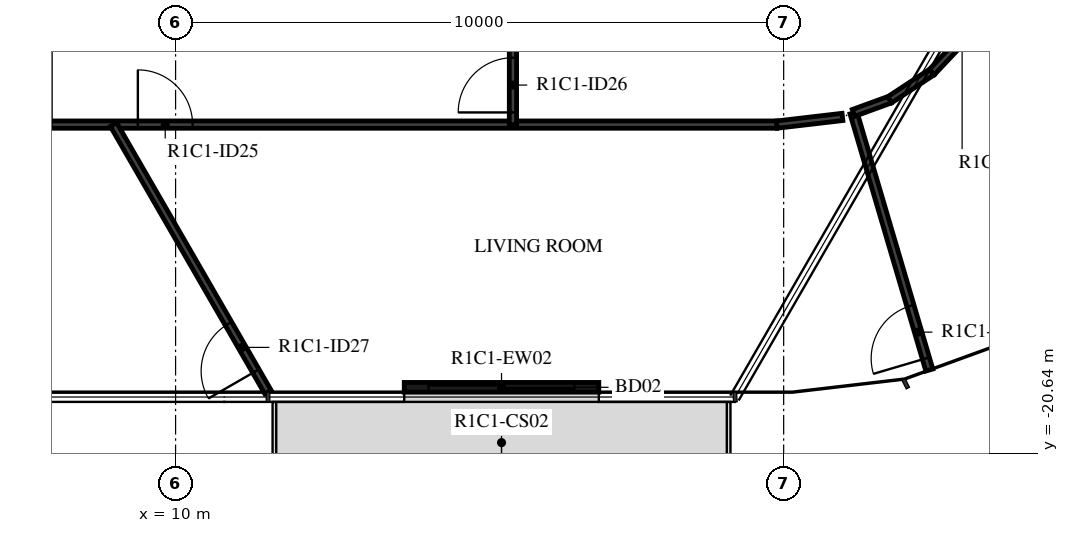
"""IFC4 building model, lengths in metres.
Left out: names, types, materials, properties, quantities, classifications, styles, units other than length and angle.
Written with IfcOpenShell. Run it as: python <this file> out.ifc"""

import sys

from ifc_helpers import new_model, si_unit, direction, frame, frame_2d, origin, place, context, subcontext, project, spatial, rectangle, extrude, element, fill, save


model = new_model("IFC4")
c1 = context("Model", 3, precision=1e-05, world=origin(), true_north=direction((0.0, 1.0)))
c2 = subcontext(c1, "Body", "Model", "MODEL_VIEW")
j1 = project(units=[si_unit("LENGTHUNIT", "METRE"), si_unit("PLANEANGLEUNIT", "RADIAN")], contexts=[c1])
p1 = place(None, origin())
s1 = spatial("IfcSite", under=j1, at=p1, CompositionType="ELEMENT")
p2 = place(p1, origin())
s2 = spatial("IfcBuilding", under=s1, at=p2, CompositionType="ELEMENT")
p3 = place(p2, frame((0.0, 0.0, 62.9)))
s3 = spatial("IfcBuildingStorey", under=s2, at=p3, CompositionType="ELEMENT", Elevation=62.9)
p4 = place(p3, frame((13.76, -19.55, 0.0), z_axis=(0.0, 0.0, 1.0), x_axis=(1.0, 0.0, 0.0)))
e1 = element("IfcWall", 1, at=p4, inside=s3, PredefinedType="STANDARD", context=c2, shape_type="SweptSolid", body=[
    extrude(rectangle(XDim=3.2, YDim=0.16, at=frame_2d((1.6, 0.0))), origin(), (0.0, 0.0, 1.0), 3.12),
])
p5 = place(p4, frame((0.4, 0.0, 0.0)))
e2 = element("IfcOpeningElement", 2, at=p5, cuts=e1, PredefinedType="OPENING", context=c2, shape_type="SweptSolid", body=[
    extrude(rectangle(XDim=2.4, YDim=2.4, at=frame_2d((1.2, 1.2))), frame((0.0, 0.09, 0.0), z_axis=(0.0, -1.0, 0.0), x_axis=(1.0, 0.0, 0.0)), (0.0, 0.0, 1.0), 0.18),
])
p6 = place(p3, frame((27.025, -15.603, 0.0), z_axis=(0.0, 0.0, 1.0), x_axis=(-0.866030653443, 0.499990907215, 0.0)))
e3 = element("IfcWall", 3, at=p6, inside=s3, PredefinedType="STANDARD", context=c2, shape_type="SweptSolid", body=[
    extrude(rectangle(XDim=6.271, YDim=0.2, at=frame_2d((3.136, 0.0))), origin(), (0.0, 0.0, 1.0), 3.12),
])
p7 = place(p3, frame((7.881, -15.23, 0.0), z_axis=(0.0, 0.0, 1.0), x_axis=(1.0, 0.0, 0.0)))
e4 = element("IfcWall", 4, at=p7, inside=s3, PredefinedType="PARTITIONING", context=c2, shape_type="SweptSolid", body=[
    extrude(rectangle(XDim=12.006, YDim=0.12, at=frame_2d((6.003, 0.0))), origin(), (0.0, 0.0, 1.0), 3.12),
])
p8 = place(p7, frame((1.499, 0.0, 0.0)))
e5 = element("IfcOpeningElement", 5, at=p8, cuts=e4, PredefinedType="OPENING", context=c2, shape_type="SweptSolid", body=[
    extrude(rectangle(XDim=0.9, YDim=2.1, at=frame_2d((0.45, 1.05))), frame((0.0, 0.07, 0.0), z_axis=(0.0, -1.0, 0.0), x_axis=(1.0, 0.0, 0.0)), (0.0, 0.0, 1.0), 0.14),
])
p9 = place(p3, frame((15.548, -15.23, 0.0), z_axis=(0.0, 0.0, 1.0), x_axis=(0.0, 1.0, 0.0)))
e6 = element("IfcWall", 6, at=p9, inside=s3, PredefinedType="PARTITIONING", context=c2, shape_type="SweptSolid", body=[
    extrude(rectangle(XDim=6.253, YDim=0.12, at=frame_2d((3.127, 0.0))), origin(), (0.0, 0.0, 1.0), 3.12),
])
p10 = place(p9, frame((0.2, 0.0, 0.0)))
e7 = element("IfcOpeningElement", 7, at=p10, cuts=e6, PredefinedType="OPENING", context=c2, shape_type="SweptSolid", body=[
    extrude(rectangle(XDim=0.9, YDim=2.1, at=frame_2d((0.45, 1.05))), frame((0.0, 0.07, 0.0), z_axis=(0.0, -1.0, 0.0), x_axis=(1.0, 0.0, 0.0)), (0.0, 0.0, 1.0), 0.14),
])
p11 = place(p3, frame((11.52, -19.63, 0.0), z_axis=(0.0, 0.0, 1.0), x_axis=(-0.499999763888, 0.866025540104, 0.0)))
e8 = element("IfcWall", 8, at=p11, inside=s3, PredefinedType="PARTITIONING", context=c2, shape_type="SweptSolid", body=[
    extrude(rectangle(XDim=5.081, YDim=0.12, at=frame_2d((2.54, 0.0))), origin(), (0.0, 0.0, 1.0), 3.12),
])
p12 = place(p11, frame((0.4, 0.0, 0.0)))
e9 = element("IfcOpeningElement", 9, at=p12, cuts=e8, PredefinedType="OPENING", context=c2, shape_type="SweptSolid", body=[
    extrude(rectangle(XDim=0.9, YDim=2.1, at=frame_2d((0.45, 1.05))), frame((0.0, 0.07, 0.0), z_axis=(0.0, -1.0, 0.0), x_axis=(1.0, 0.0, 0.0)), (0.0, 0.0, 1.0), 0.14),
])
p13 = place(p3, frame((20.967, -15.104, 0.0), z_axis=(0.0, 0.0, 1.0), x_axis=(-0.993231641151, -0.116150363826, 0.0)))
e10 = element("IfcWall", 10, at=p13, inside=s3, PredefinedType="PARTITIONING", context=c2, shape_type="SweptSolid", body=[
    extrude(rectangle(XDim=1.087, YDim=0.12, at=frame_2d((0.543, 0.0))), origin(), (0.0, 0.0, 1.0), 3.12),
])
p14 = place(p3, frame((22.396, -19.266, 0.0), z_axis=(0.0, 0.0, 1.0), x_axis=(-0.282873823334, 0.959157130022, 0.0)))
e11 = element("IfcWall", 11, at=p14, inside=s3, PredefinedType="PARTITIONING", context=c2, shape_type="SweptSolid", body=[
    extrude(rectangle(XDim=4.409, YDim=0.12, at=frame_2d((2.204, 0.0))), origin(), (0.0, 0.0, 1.0), 3.12),
])
p15 = place(p14, frame((0.2, 0.0, 0.0)))
e12 = element("IfcOpeningElement", 12, at=p15, cuts=e11, PredefinedType="OPENING", context=c2, shape_type="SweptSolid", body=[
    extrude(rectangle(XDim=0.9, YDim=2.1, at=frame_2d((0.45, 1.05))), frame((0.0, 0.07, 0.0), z_axis=(0.0, -1.0, 0.0), x_axis=(1.0, 0.0, 0.0)), (0.0, 0.0, 1.0), 0.14),
])
p16 = place(p3, frame((21.149, -15.038, 0.0), z_axis=(0.0, 0.0, 1.0), x_axis=(0.939726102094, 0.341928140173, 0.0)))
e13 = element("IfcWall", 13, at=p16, inside=s3, PredefinedType="PARTITIONING", context=c2, shape_type="SweptSolid", body=[
    extrude(rectangle(XDim=0.635, YDim=0.12, at=frame_2d((0.318, 0.0))), origin(), (0.0, 0.0, 1.0), 3.12),
])
p17 = place(p3, frame((21.746, -14.82, 0.0), z_axis=(0.0, 0.0, 1.0), x_axis=(0.835477570013, 0.549524549046, 0.0)))
e14 = element("IfcWall", 14, at=p17, inside=s3, PredefinedType="PARTITIONING", context=c2, shape_type="SweptSolid", body=[
    extrude(rectangle(XDim=0.829, YDim=0.12, at=frame_2d((0.415, 0.0))), origin(), (0.0, 0.0, 1.0), 3.12),
])
p18 = place(p3, frame((22.438, -14.365, 0.0), z_axis=(0.0, 0.0, 1.0), x_axis=(0.686182189596, 0.727429723535, 0.0)))
e15 = element("IfcWall", 15, at=p18, inside=s3, PredefinedType="PARTITIONING", context=c2, shape_type="SweptSolid", body=[
    extrude(rectangle(XDim=0.829, YDim=0.12, at=frame_2d((0.414, 0.0))), origin(), (0.0, 0.0, 1.0), 3.12),
])
p19 = place(p5, origin())
e16 = element("IfcDoor", 16, at=p19, inside=s3, OperationType="DOUBLE_DOOR_SLIDING", PredefinedType="DOOR", context=c2, shape_type="SweptSolid", body=[
    extrude(rectangle(XDim=2.4, YDim=2.4, at=frame_2d((1.2, 1.2))), frame((0.0, 0.025, 0.0), z_axis=(0.0, -1.0, 0.0), x_axis=(1.0, 0.0, 0.0)), (0.0, 0.0, 1.0), 0.05),
])
fill(e2, e16)
p20 = place(p8, origin())
e17 = element("IfcDoor", 17, at=p20, inside=s3, OperationType="SINGLE_SWING_RIGHT", PredefinedType="DOOR", context=c2, shape_type="SweptSolid", body=[
    extrude(rectangle(XDim=0.9, YDim=2.1, at=frame_2d((0.45, 1.05))), frame((0.0, 0.025, 0.0), z_axis=(0.0, -1.0, 0.0), x_axis=(1.0, 0.0, 0.0)), (0.0, 0.0, 1.0), 0.05),
])
fill(e5, e17)
p21 = place(p10, origin())
e18 = element("IfcDoor", 18, at=p21, inside=s3, OperationType="SINGLE_SWING_RIGHT", PredefinedType="DOOR", context=c2, shape_type="SweptSolid", body=[
    extrude(rectangle(XDim=0.9, YDim=2.1, at=frame_2d((0.45, 1.05))), frame((0.0, 0.025, 0.0), z_axis=(0.0, -1.0, 0.0), x_axis=(1.0, 0.0, 0.0)), (0.0, 0.0, 1.0), 0.05),
])
fill(e7, e18)
p22 = place(p12, origin())
e19 = element("IfcDoor", 19, at=p22, inside=s3, OperationType="SINGLE_SWING_LEFT", PredefinedType="DOOR", context=c2, shape_type="SweptSolid", body=[
    extrude(rectangle(XDim=0.9, YDim=2.1, at=frame_2d((0.45, 1.05))), frame((0.0, 0.025, 0.0), z_axis=(0.0, -1.0, 0.0), x_axis=(1.0, 0.0, 0.0)), (0.0, 0.0, 1.0), 0.05),
])
fill(e9, e19)
p23 = place(p15, origin())
e20 = element("IfcDoor", 20, at=p23, inside=s3, OperationType="SINGLE_SWING_RIGHT", PredefinedType="DOOR", context=c2, shape_type="SweptSolid", body=[
    extrude(rectangle(XDim=0.9, YDim=2.1, at=frame_2d((0.45, 1.05))), frame((0.0, 0.025, 0.0), z_axis=(0.0, -1.0, 0.0), x_axis=(1.0, 0.0, 0.0)), (0.0, 0.0, 1.0), 0.05),
])
fill(e12, e20)
save(model, sys.argv[1])
